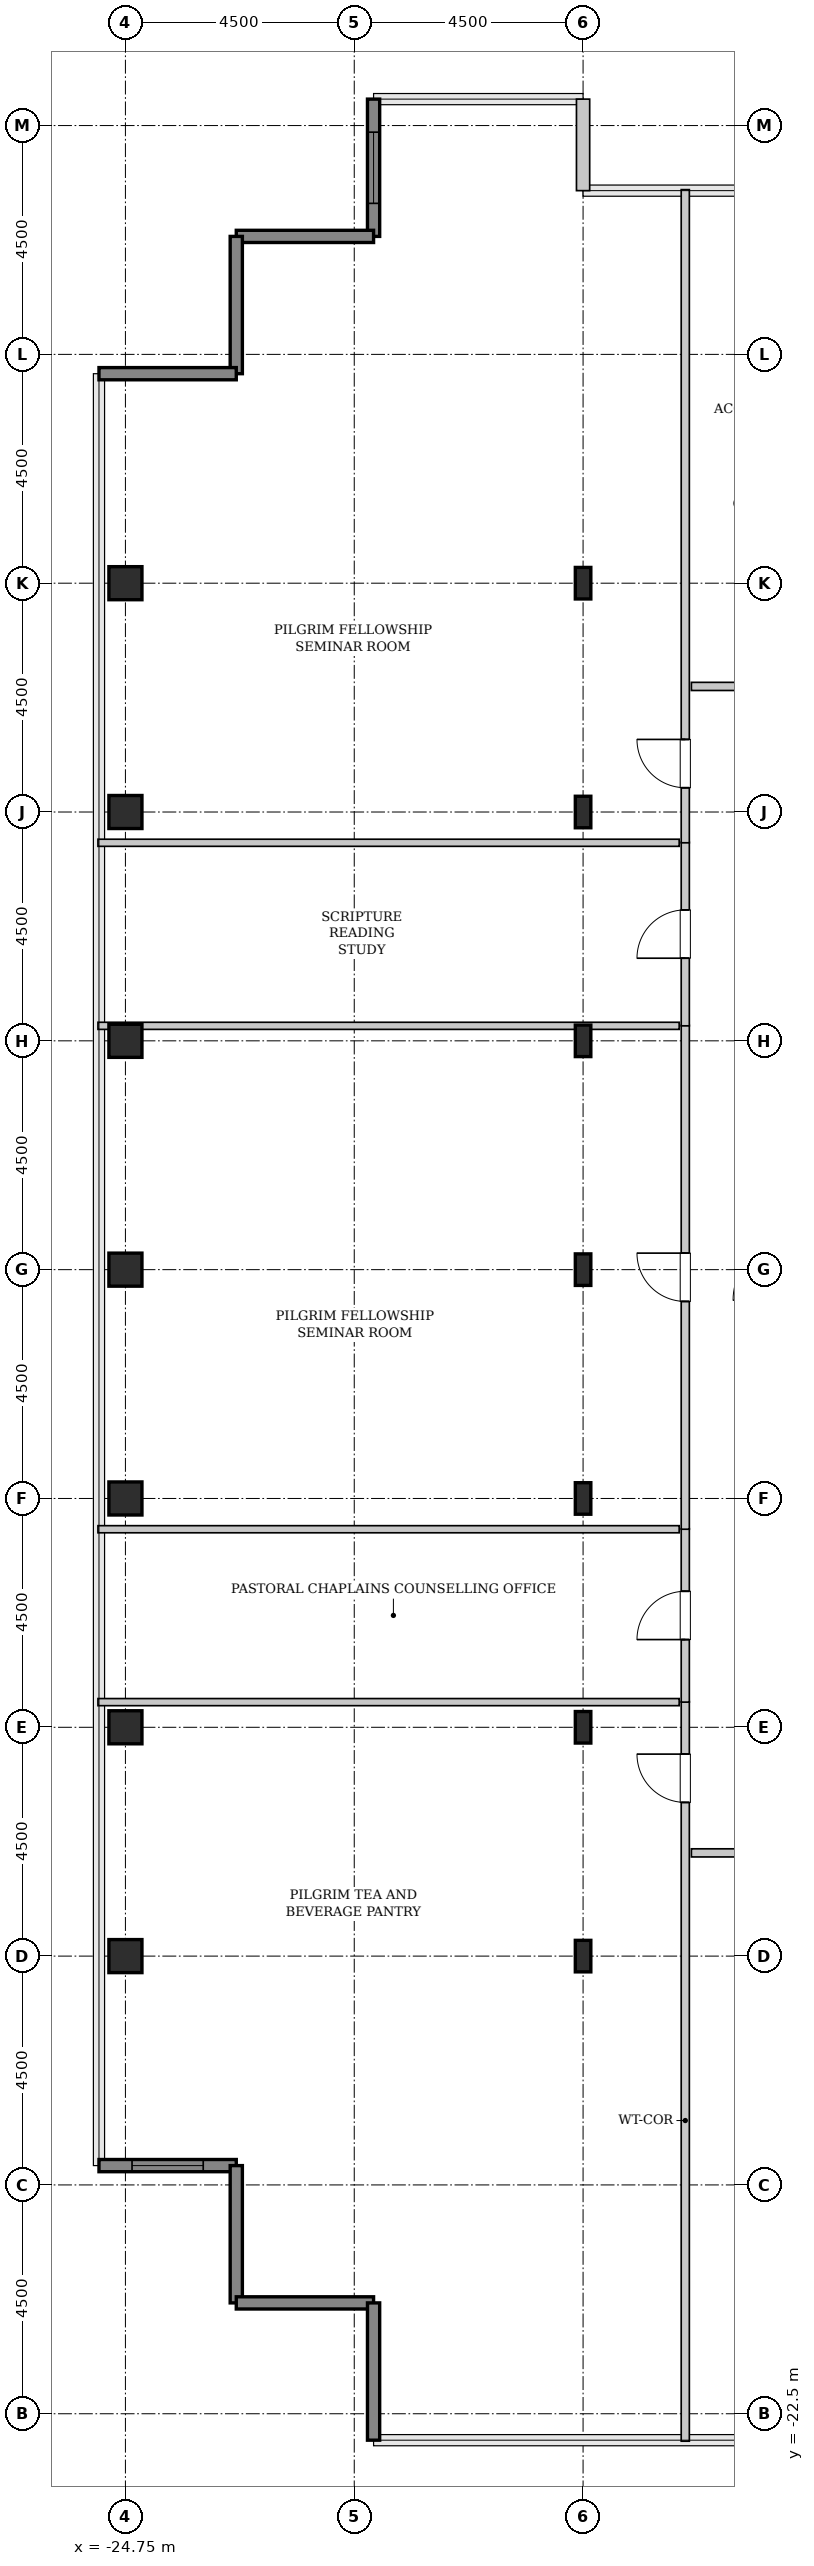
"""IFC4 building model, lengths in metres.
Left out: names, types, materials, properties, quantities, classifications, styles, units other than length and angle.
Written with IfcOpenShell. Run it as: python <this file> out.ifc"""

import sys

from ifc_helpers import new_model, si_unit, direction, frame, frame_2d, origin, origin_2d, place, context, subcontext, project, spatial, rectangle, hollow_rectangle, i_section, extrude, source, transform, mapped, element, fill, save


model = new_model("IFC4")
c1 = context("Model", 3, precision=1e-05, world=origin(), true_north=direction((0.0, 1.0)))
c2 = subcontext(c1, "Body", "Model", "MODEL_VIEW")
j1 = project(units=[si_unit("LENGTHUNIT", "METRE"), si_unit("PLANEANGLEUNIT", "RADIAN")], contexts=[c1])
p1 = place(None, origin())
s1 = spatial("IfcSite", under=j1, at=p1, CompositionType="ELEMENT")
p2 = place(p1, origin())
s2 = spatial("IfcBuilding", under=s1, at=p2, CompositionType="ELEMENT")
p3 = place(p2, frame((0.0, 0.0, 283.6)))
s3 = spatial("IfcBuildingStorey", under=s2, at=p3, CompositionType="ELEMENT", Elevation=283.6)
m1 = source(origin(), c2, "Body", "SweptSolid", [
    extrude(hollow_rectangle(XDim=0.65, YDim=0.65, WallThickness=0.032, InnerFilletRadius=0.032, OuterFilletRadius=0.064, at=origin_2d()), origin(), (0.0, 0.0, 1.0), 3.8),
])
for number, where, z_axis, x_axis in (
    (1, (-24.75, -13.5, 0.0), (0.0, 0.0, 1.0), (1.0, 0.0, 0.0)),
    (2, (-24.75, -9.0, 0.0), (0.0, 0.0, 1.0), (1.0, 0.0, 0.0)),
    (3, (-24.75, -4.5, 0.0), (0.0, 0.0, 1.0), (1.0, 0.0, 0.0)),
    (4, (-24.75, 0.0, 0.0), (0.0, 0.0, 1.0), (1.0, 0.0, 0.0)),
    (5, (-24.75, 4.5, 0.0), (0.0, 0.0, 1.0), (1.0, 0.0, 0.0)),
    (6, (-24.75, 9.0, 0.0), (0.0, 0.0, 1.0), (1.0, 0.0, 0.0)),
    (7, (-24.75, 13.5, 0.0), (0.0, 0.0, 1.0), (1.0, 0.0, 0.0)),
):
    element("IfcColumn", number, at=place(p3, frame(where, z_axis=z_axis, x_axis=x_axis)), inside=s3, PredefinedType="COLUMN", context=c2, shape_type="MappedRepresentation", body=[
        mapped(m1, transform((0.0, 0.0, 0.0), x_axis=(1.0, 0.0, 0.0), y_axis=(0.0, 1.0, 0.0), z_axis=(0.0, 0.0, 1.0), scale=1.0)),
    ])
m2 = source(origin(), c2, "Body", "SweptSolid", [
    extrude(i_section(OverallWidth=0.305, OverallDepth=0.62, WebThickness=0.021, FlangeThickness=0.04, FilletRadius=0.027, at=origin_2d()), origin(), (0.0, 0.0, 1.0), 3.8),
])
for number, where, z_axis, x_axis in (
    (8, (-15.75, -13.5, 0.0), (0.0, 0.0, 1.0), (1.0, 0.0, 0.0)),
    (9, (-15.75, -9.0, 0.0), (0.0, 0.0, 1.0), (1.0, 0.0, 0.0)),
    (10, (-15.75, -4.5, 0.0), (0.0, 0.0, 1.0), (1.0, 0.0, 0.0)),
    (11, (-15.75, 0.0, 0.0), (0.0, 0.0, 1.0), (1.0, 0.0, 0.0)),
    (12, (-15.75, 4.5, 0.0), (0.0, 0.0, 1.0), (1.0, 0.0, 0.0)),
    (13, (-15.75, 9.0, 0.0), (0.0, 0.0, 1.0), (1.0, 0.0, 0.0)),
    (14, (-15.75, 13.5, 0.0), (0.0, 0.0, 1.0), (1.0, 0.0, 0.0)),
):
    element("IfcColumn", number, at=place(p3, frame(where, z_axis=z_axis, x_axis=x_axis)), inside=s3, PredefinedType="COLUMN", context=c2, shape_type="MappedRepresentation", body=[
        mapped(m2, transform((0.0, 0.0, 0.0), x_axis=(1.0, 0.0, 0.0), y_axis=(0.0, 1.0, 0.0), z_axis=(0.0, 0.0, 1.0), scale=1.0)),
    ])
m3 = source(origin(), c2, "Body", "SweptSolid", [
    extrude(rectangle(XDim=1.8, YDim=0.26, at=frame_2d((0.9, 0.0))), origin(), (0.0, 0.0, 1.0), 3.55),
])
p4 = place(p3, frame((-15.75, 21.22, 0.0), z_axis=(0.0, 0.0, 1.0), x_axis=(0.0, 1.0, 0.0)))
e15 = element("IfcWall", 15, at=p4, inside=s3, PredefinedType="SOLIDWALL", context=c2, shape_type="MappedRepresentation", body=[
    mapped(m3, transform((0.0, 0.0, 0.0), x_axis=(1.0, 0.0, 0.0), y_axis=(0.0, 1.0, 0.0), z_axis=(0.0, 0.0, 1.0), scale=1.0)),
])
m4 = source(origin(), c2, "Body", "SweptSolid", [
    extrude(rectangle(XDim=2.7, YDim=0.24, at=frame_2d((1.35, 0.0))), origin(), (0.0, 0.0, 1.0), 3.55),
])
p5 = place(p3, frame((-19.87, 23.02, 0.0), z_axis=(0.0, 0.0, 1.0), x_axis=(0.0, -1.0, 0.0)))
e16 = element("IfcWall", 16, at=p5, inside=s3, PredefinedType="SHEAR", context=c2, shape_type="MappedRepresentation", body=[
    mapped(m4, transform((0.0, 0.0, 0.0), x_axis=(1.0, 0.0, 0.0), y_axis=(0.0, 1.0, 0.0), z_axis=(0.0, 0.0, 1.0), scale=1.0)),
])
p6 = place(p5, frame((0.65, 0.0, 0.85)))
e17 = element("IfcOpeningElement", 17, at=p6, cuts=e16, PredefinedType="OPENING", context=c2, shape_type="SweptSolid", body=[
    extrude(rectangle(XDim=1.4, YDim=1.8, at=frame_2d((0.7, 0.9))), frame((0.0, 0.13, 0.0), z_axis=(0.0, -1.0, 0.0), x_axis=(1.0, 0.0, 0.0)), (0.0, 0.0, 1.0), 0.26),
])
for number, where, z_axis, x_axis in (
    (18, (-19.87, 20.32, 0.0), (0.0, 0.0, 1.0), (-1.0, 0.0, 0.0)),
    (19, (-22.57, 20.32, 0.0), (0.0, 0.0, 1.0), (0.0, -1.0, 0.0)),
    (20, (-22.57, 17.62, 0.0), (0.0, 0.0, 1.0), (-1.0, 0.0, 0.0)),
):
    element("IfcWall", number, at=place(p3, frame(where, z_axis=z_axis, x_axis=x_axis)), inside=s3, PredefinedType="SHEAR", context=c2, shape_type="MappedRepresentation", body=[
        mapped(m4, transform((0.0, 0.0, 0.0), x_axis=(1.0, 0.0, 0.0), y_axis=(0.0, 1.0, 0.0), z_axis=(0.0, 0.0, 1.0), scale=1.0)),
    ])
p7 = place(p3, frame((-25.27, -17.62, 0.0), z_axis=(0.0, 0.0, 1.0), x_axis=(1.0, 0.0, 0.0)))
e21 = element("IfcWall", 21, at=p7, inside=s3, PredefinedType="SHEAR", context=c2, shape_type="MappedRepresentation", body=[
    mapped(m4, transform((0.0, 0.0, 0.0), x_axis=(1.0, 0.0, 0.0), y_axis=(0.0, 1.0, 0.0), z_axis=(0.0, 0.0, 1.0), scale=1.0)),
])
p8 = place(p7, frame((0.65, 0.0, 0.85)))
e22 = element("IfcOpeningElement", 22, at=p8, cuts=e21, PredefinedType="OPENING", context=c2, shape_type="SweptSolid", body=[
    extrude(rectangle(XDim=1.4, YDim=1.8, at=frame_2d((0.7, 0.9))), frame((0.0, 0.13, 0.0), z_axis=(0.0, -1.0, 0.0), x_axis=(1.0, 0.0, 0.0)), (0.0, 0.0, 1.0), 0.26),
])
for number, where, z_axis, x_axis in (
    (23, (-22.57, -17.62, 0.0), (0.0, 0.0, 1.0), (0.0, -1.0, 0.0)),
    (24, (-22.57, -20.32, 0.0), (0.0, 0.0, 1.0), (1.0, 0.0, 0.0)),
    (25, (-19.87, -20.32, 0.0), (0.0, 0.0, 1.0), (0.0, -1.0, 0.0)),
):
    element("IfcWall", number, at=place(p3, frame(where, z_axis=z_axis, x_axis=x_axis)), inside=s3, PredefinedType="SHEAR", context=c2, shape_type="MappedRepresentation", body=[
        mapped(m4, transform((0.0, 0.0, 0.0), x_axis=(1.0, 0.0, 0.0), y_axis=(0.0, 1.0, 0.0), z_axis=(0.0, 0.0, 1.0), scale=1.0)),
    ])
m5 = source(origin(), c2, "Body", "SweptSolid", [
    extrude(rectangle(XDim=14.545, YDim=0.16, at=frame_2d((7.272, 0.0))), origin(), (0.0, 0.0, 1.0), 3.535),
])
p9 = place(p3, frame((-13.74, -23.04, 0.0), z_axis=(0.0, 0.0, 1.0), x_axis=(0.0, 1.0, 0.0)))
e26 = element("IfcWall", 26, at=p9, inside=s3, PredefinedType="PARTITIONING", context=c2, shape_type="MappedRepresentation", body=[
    mapped(m5, transform((0.0, 0.0, 0.0), x_axis=(1.0, 0.0, 0.0), y_axis=(0.0, 1.0, 0.0), z_axis=(0.0, 0.0, 1.0), scale=1.0)),
])
p10 = place(p9, frame((12.562, 0.0, 0.0)))
e27 = element("IfcOpeningElement", 27, at=p10, cuts=e26, PredefinedType="OPENING", context=c2, shape_type="SweptSolid", body=[
    extrude(rectangle(XDim=0.95, YDim=2.1, at=frame_2d((0.475, 1.05))), frame((0.0, 0.09, 0.0), z_axis=(0.0, -1.0, 0.0), x_axis=(1.0, 0.0, 0.0)), (0.0, 0.0, 1.0), 0.18),
])
m6 = source(origin(), c2, "Body", "SweptSolid", [
    extrude(rectangle(XDim=11.43, YDim=0.14, at=frame_2d((5.715, 0.0))), origin(), (0.0, 0.0, 1.0), 2.925),
])
p11 = place(p3, frame((-25.29, -8.505, 0.0), z_axis=(0.0, 0.0, 1.0), x_axis=(1.0, 0.0, 0.0)))
e28 = element("IfcWall", 28, at=p11, inside=s3, PredefinedType="PARTITIONING", context=c2, shape_type="MappedRepresentation", body=[
    mapped(m6, transform((0.0, 0.0, 0.0), x_axis=(1.0, 0.0, 0.0), y_axis=(0.0, 1.0, 0.0), z_axis=(0.0, 0.0, 1.0), scale=1.0)),
])
m7 = source(origin(), c2, "Body", "SweptSolid", [
    extrude(rectangle(XDim=3.41, YDim=0.16, at=frame_2d((1.705, 0.0))), origin(), (0.0, 0.0, 1.0), 3.535),
])
p12 = place(p3, frame((-13.74, -8.505, 0.0), z_axis=(0.0, 0.0, 1.0), x_axis=(0.0, 1.0, 0.0)))
e29 = element("IfcWall", 29, at=p12, inside=s3, PredefinedType="PARTITIONING", context=c2, shape_type="MappedRepresentation", body=[
    mapped(m7, transform((0.0, 0.0, 0.0), x_axis=(1.0, 0.0, 0.0), y_axis=(0.0, 1.0, 0.0), z_axis=(0.0, 0.0, 1.0), scale=1.0)),
])
p13 = place(p12, frame((1.23, 0.0, 0.0)))
e30 = element("IfcOpeningElement", 30, at=p13, cuts=e29, PredefinedType="OPENING", context=c2, shape_type="SweptSolid", body=[
    extrude(rectangle(XDim=0.95, YDim=2.1, at=frame_2d((0.475, 1.05))), frame((0.0, 0.09, 0.0), z_axis=(0.0, -1.0, 0.0), x_axis=(1.0, 0.0, 0.0)), (0.0, 0.0, 1.0), 0.18),
])
m8 = source(origin(), c2, "Body", "SweptSolid", [
    extrude(rectangle(XDim=11.43, YDim=0.14, at=frame_2d((5.715, 0.0))), origin(), (0.0, 0.0, 1.0), 3.535),
])
p14 = place(p3, frame((-25.29, -5.105, 0.0), z_axis=(0.0, 0.0, 1.0), x_axis=(1.0, 0.0, 0.0)))
e31 = element("IfcWall", 31, at=p14, inside=s3, PredefinedType="PARTITIONING", context=c2, shape_type="MappedRepresentation", body=[
    mapped(m8, transform((0.0, 0.0, 0.0), x_axis=(1.0, 0.0, 0.0), y_axis=(0.0, 1.0, 0.0), z_axis=(0.0, 0.0, 1.0), scale=1.0)),
])
m9 = source(origin(), c2, "Body", "SweptSolid", [
    extrude(rectangle(XDim=9.91, YDim=0.16, at=frame_2d((4.955, 0.0))), origin(), (0.0, 0.0, 1.0), 3.535),
])
p15 = place(p3, frame((-13.74, -5.105, 0.0), z_axis=(0.0, 0.0, 1.0), x_axis=(0.0, 1.0, 0.0)))
e32 = element("IfcWall", 32, at=p15, inside=s3, PredefinedType="PARTITIONING", context=c2, shape_type="MappedRepresentation", body=[
    mapped(m9, transform((0.0, 0.0, 0.0), x_axis=(1.0, 0.0, 0.0), y_axis=(0.0, 1.0, 0.0), z_axis=(0.0, 0.0, 1.0), scale=1.0)),
])
p16 = place(p15, frame((4.48, 0.0, 0.0)))
e33 = element("IfcOpeningElement", 33, at=p16, cuts=e32, PredefinedType="OPENING", context=c2, shape_type="SweptSolid", body=[
    extrude(rectangle(XDim=0.95, YDim=2.1, at=frame_2d((0.475, 1.05))), frame((0.0, 0.09, 0.0), z_axis=(0.0, -1.0, 0.0), x_axis=(1.0, 0.0, 0.0)), (0.0, 0.0, 1.0), 0.18),
])
p17 = place(p3, frame((-25.29, 4.795, 0.0), z_axis=(0.0, 0.0, 1.0), x_axis=(1.0, 0.0, 0.0)))
e34 = element("IfcWall", 34, at=p17, inside=s3, PredefinedType="PARTITIONING", context=c2, shape_type="MappedRepresentation", body=[
    mapped(m6, transform((0.0, 0.0, 0.0), x_axis=(1.0, 0.0, 0.0), y_axis=(0.0, 1.0, 0.0), z_axis=(0.0, 0.0, 1.0), scale=1.0)),
])
m10 = source(origin(), c2, "Body", "SweptSolid", [
    extrude(rectangle(XDim=3.61, YDim=0.16, at=frame_2d((1.805, 0.0))), origin(), (0.0, 0.0, 1.0), 3.535),
])
p18 = place(p3, frame((-13.74, 4.795, 0.0), z_axis=(0.0, 0.0, 1.0), x_axis=(0.0, 1.0, 0.0)))
e35 = element("IfcWall", 35, at=p18, inside=s3, PredefinedType="PARTITIONING", context=c2, shape_type="MappedRepresentation", body=[
    mapped(m10, transform((0.0, 0.0, 0.0), x_axis=(1.0, 0.0, 0.0), y_axis=(0.0, 1.0, 0.0), z_axis=(0.0, 0.0, 1.0), scale=1.0)),
])
p19 = place(p18, frame((1.33, 0.0, 0.0)))
e36 = element("IfcOpeningElement", 36, at=p19, cuts=e35, PredefinedType="OPENING", context=c2, shape_type="SweptSolid", body=[
    extrude(rectangle(XDim=0.95, YDim=2.1, at=frame_2d((0.475, 1.05))), frame((0.0, 0.09, 0.0), z_axis=(0.0, -1.0, 0.0), x_axis=(1.0, 0.0, 0.0)), (0.0, 0.0, 1.0), 0.18),
])
p20 = place(p3, frame((-25.29, 8.395, 0.0), z_axis=(0.0, 0.0, 1.0), x_axis=(1.0, 0.0, 0.0)))
e37 = element("IfcWall", 37, at=p20, inside=s3, PredefinedType="PARTITIONING", context=c2, shape_type="MappedRepresentation", body=[
    mapped(m8, transform((0.0, 0.0, 0.0), x_axis=(1.0, 0.0, 0.0), y_axis=(0.0, 1.0, 0.0), z_axis=(0.0, 0.0, 1.0), scale=1.0)),
])
m11 = source(origin(), c2, "Body", "SweptSolid", [
    extrude(rectangle(XDim=12.845, YDim=0.16, at=frame_2d((6.422, 0.0))), origin(), (0.0, 0.0, 1.0), 3.535),
])
p21 = place(p3, frame((-13.74, 8.395, 0.0), z_axis=(0.0, 0.0, 1.0), x_axis=(0.0, 1.0, 0.0)))
e38 = element("IfcWall", 38, at=p21, inside=s3, PredefinedType="PARTITIONING", context=c2, shape_type="MappedRepresentation", body=[
    mapped(m11, transform((0.0, 0.0, 0.0), x_axis=(1.0, 0.0, 0.0), y_axis=(0.0, 1.0, 0.0), z_axis=(0.0, 0.0, 1.0), scale=1.0)),
])
p22 = place(p21, frame((1.083, 0.0, 0.0)))
e39 = element("IfcOpeningElement", 39, at=p22, cuts=e38, PredefinedType="OPENING", context=c2, shape_type="SweptSolid", body=[
    extrude(rectangle(XDim=0.95, YDim=2.1, at=frame_2d((0.475, 1.05))), frame((0.0, 0.09, 0.0), z_axis=(0.0, -1.0, 0.0), x_axis=(1.0, 0.0, 0.0)), (0.0, 0.0, 1.0), 0.18),
])
m12 = source(origin(), c2, "Body", "SweptSolid", [
    extrude(rectangle(XDim=4.125, YDim=0.16, at=frame_2d((2.062, 0.0))), origin(), (0.0, 0.0, 1.0), 3.535),
])
p23 = place(p3, frame((-13.62, 11.47, 0.0), z_axis=(0.0, 0.0, 1.0), x_axis=(1.0, 0.0, 0.0)))
e40 = element("IfcWall", 40, at=p23, inside=s3, PredefinedType="PARTITIONING", context=c2, shape_type="MappedRepresentation", body=[
    mapped(m12, transform((0.0, 0.0, 0.0), x_axis=(1.0, 0.0, 0.0), y_axis=(0.0, 1.0, 0.0), z_axis=(0.0, 0.0, 1.0), scale=1.0)),
])
p24 = place(p23, frame((1.587, 0.0, 0.0)))
e41 = element("IfcOpeningElement", 41, at=p24, cuts=e40, PredefinedType="OPENING", context=c2, shape_type="SweptSolid", body=[
    extrude(rectangle(XDim=0.95, YDim=2.1, at=frame_2d((0.475, 1.05))), frame((0.0, 0.09, 0.0), z_axis=(0.0, -1.0, 0.0), x_axis=(1.0, 0.0, 0.0)), (0.0, 0.0, 1.0), 0.18),
])
m13 = source(origin(), c2, "Body", "SweptSolid", [
    extrude(rectangle(XDim=5.025, YDim=0.16, at=frame_2d((2.513, 0.0))), origin(), (0.0, 0.0, 1.0), 3.535),
])
p25 = place(p3, frame((-13.62, -11.47, 0.0), z_axis=(0.0, 0.0, 1.0), x_axis=(1.0, 0.0, 0.0)))
e42 = element("IfcWall", 42, at=p25, inside=s3, PredefinedType="PARTITIONING", context=c2, shape_type="MappedRepresentation", body=[
    mapped(m13, transform((0.0, 0.0, 0.0), x_axis=(1.0, 0.0, 0.0), y_axis=(0.0, 1.0, 0.0), z_axis=(0.0, 0.0, 1.0), scale=1.0)),
])
p26 = place(p25, frame((2.038, 0.0, 0.0)))
e43 = element("IfcOpeningElement", 43, at=p26, cuts=e42, PredefinedType="OPENING", context=c2, shape_type="SweptSolid", body=[
    extrude(rectangle(XDim=0.95, YDim=2.1, at=frame_2d((0.475, 1.05))), frame((0.0, 0.09, 0.0), z_axis=(0.0, -1.0, 0.0), x_axis=(1.0, 0.0, 0.0)), (0.0, 0.0, 1.0), 0.18),
])
m14 = source(origin(), c2, "Body", "SweptSolid", [
    extrude(rectangle(XDim=1.4, YDim=1.8, at=frame_2d((0.7, 0.9))), frame((0.0, 0.03, 0.0), z_axis=(0.0, -1.0, 0.0), x_axis=(1.0, 0.0, 0.0)), (0.0, 0.0, 1.0), 0.06),
])
p27 = place(p6, origin())
e44 = element("IfcWindow", 44, at=p27, inside=s3, PartitioningType="SINGLE_PANEL", PredefinedType="WINDOW", context=c2, shape_type="MappedRepresentation", body=[
    mapped(m14, transform((0.0, 0.0, 0.0), x_axis=(1.0, 0.0, 0.0), y_axis=(0.0, 1.0, 0.0), z_axis=(0.0, 0.0, 1.0), scale=1.0)),
])
fill(e17, e44)
p28 = place(p8, origin())
e45 = element("IfcWindow", 45, at=p28, inside=s3, PartitioningType="SINGLE_PANEL", PredefinedType="WINDOW", context=c2, shape_type="MappedRepresentation", body=[
    mapped(m14, transform((0.0, 0.0, 0.0), x_axis=(1.0, 0.0, 0.0), y_axis=(0.0, 1.0, 0.0), z_axis=(0.0, 0.0, 1.0), scale=1.0)),
])
fill(e22, e45)
m15 = source(origin(), c2, "Body", "SweptSolid", [
    extrude(rectangle(XDim=0.95, YDim=2.1, at=frame_2d((0.475, 1.05))), frame((0.0, 0.025, 0.0), z_axis=(0.0, -1.0, 0.0), x_axis=(1.0, 0.0, 0.0)), (0.0, 0.0, 1.0), 0.05),
])
p29 = place(p10, origin())
e46 = element("IfcDoor", 46, at=p29, inside=s3, OperationType="SINGLE_SWING_RIGHT", PredefinedType="DOOR", context=c2, shape_type="MappedRepresentation", body=[
    mapped(m15, transform((0.0, 0.0, 0.0), x_axis=(1.0, 0.0, 0.0), y_axis=(0.0, 1.0, 0.0), z_axis=(0.0, 0.0, 1.0), scale=1.0)),
])
fill(e27, e46)
p30 = place(p13, origin())
e47 = element("IfcDoor", 47, at=p30, inside=s3, OperationType="SINGLE_SWING_LEFT", PredefinedType="DOOR", context=c2, shape_type="MappedRepresentation", body=[
    mapped(m15, transform((0.0, 0.0, 0.0), x_axis=(1.0, 0.0, 0.0), y_axis=(0.0, 1.0, 0.0), z_axis=(0.0, 0.0, 1.0), scale=1.0)),
])
fill(e30, e47)
p31 = place(p16, origin())
e48 = element("IfcDoor", 48, at=p31, inside=s3, OperationType="SINGLE_SWING_RIGHT", PredefinedType="DOOR", context=c2, shape_type="MappedRepresentation", body=[
    mapped(m15, transform((0.0, 0.0, 0.0), x_axis=(1.0, 0.0, 0.0), y_axis=(0.0, 1.0, 0.0), z_axis=(0.0, 0.0, 1.0), scale=1.0)),
])
fill(e33, e48)
p32 = place(p19, origin())
e49 = element("IfcDoor", 49, at=p32, inside=s3, OperationType="SINGLE_SWING_LEFT", PredefinedType="DOOR", context=c2, shape_type="MappedRepresentation", body=[
    mapped(m15, transform((0.0, 0.0, 0.0), x_axis=(1.0, 0.0, 0.0), y_axis=(0.0, 1.0, 0.0), z_axis=(0.0, 0.0, 1.0), scale=1.0)),
])
fill(e36, e49)
p33 = place(p22, origin())
e50 = element("IfcDoor", 50, at=p33, inside=s3, OperationType="SINGLE_SWING_RIGHT", PredefinedType="DOOR", context=c2, shape_type="MappedRepresentation", body=[
    mapped(m15, transform((0.0, 0.0, 0.0), x_axis=(1.0, 0.0, 0.0), y_axis=(0.0, 1.0, 0.0), z_axis=(0.0, 0.0, 1.0), scale=1.0)),
])
fill(e39, e50)
save(model, sys.argv[1])
